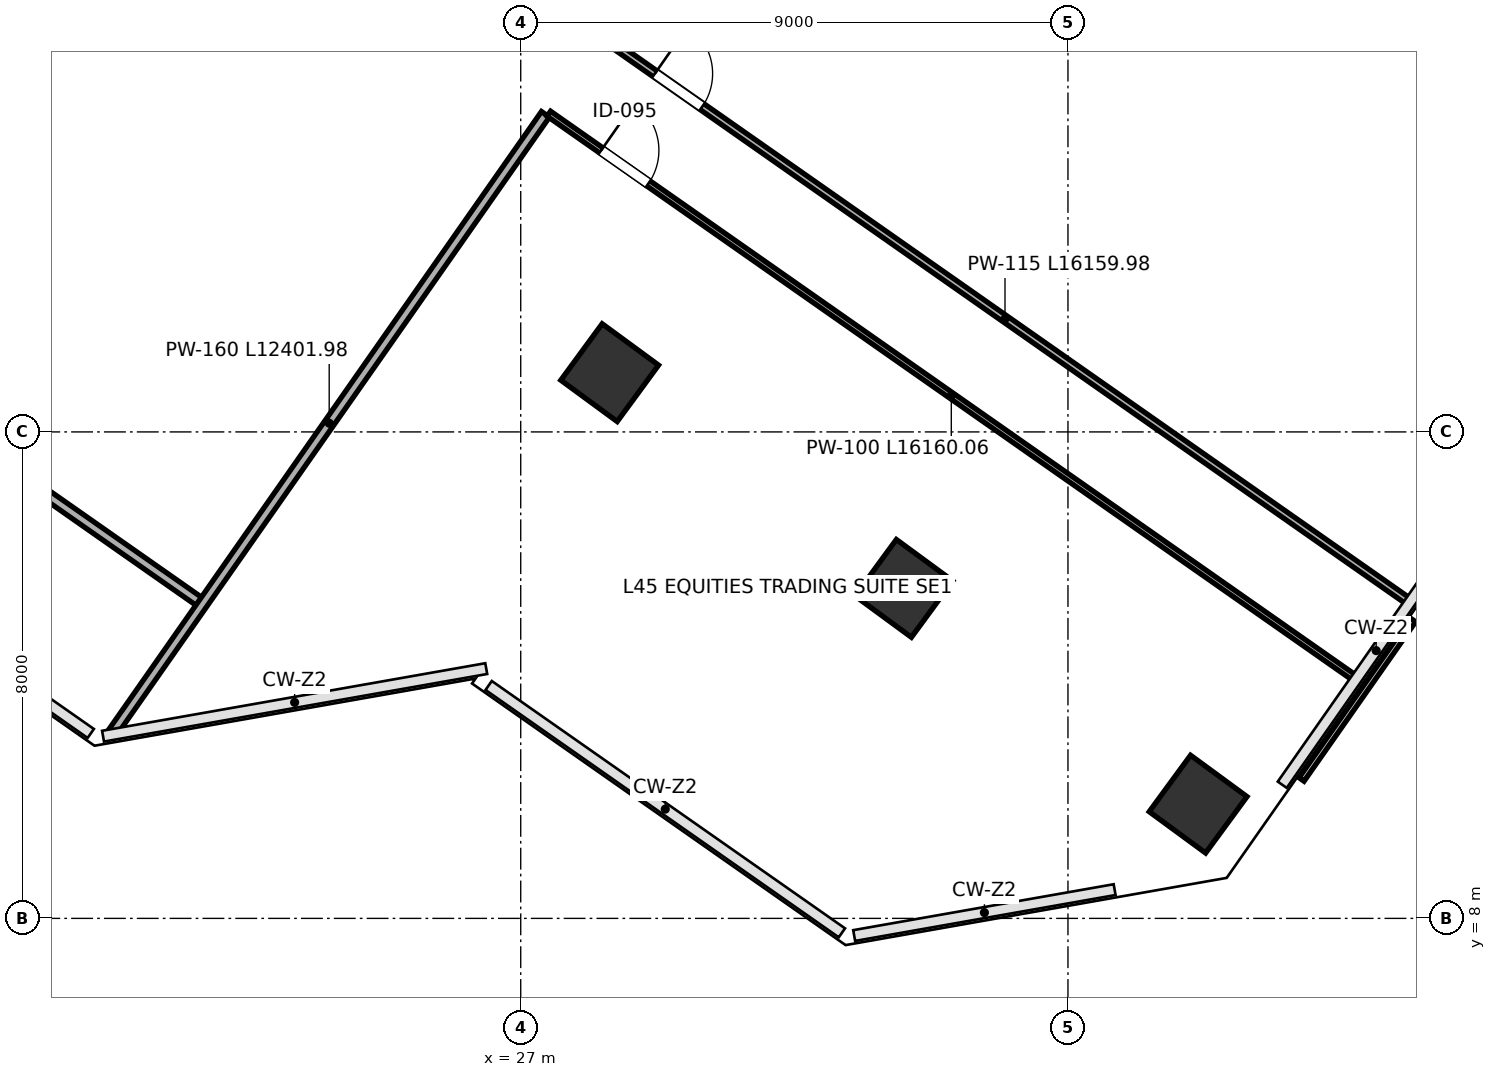
"""IFC4 building model, lengths in metres.
Left out: names, types, materials, properties, quantities, classifications, styles, units other than length and angle.
Written with IfcOpenShell. Run it as: python <this file> out.ifc"""

import sys

from ifc_helpers import new_model, si_unit, direction, frame, frame_2d, origin, origin_2d, place, context, subcontext, project, spatial, rectangle, extrude, clip, halfspace, source, transform, mapped, element, fill, save


model = new_model("IFC4")
c1 = context("Model", 3, precision=1e-05, world=origin(), true_north=direction((0.0, 1.0)))
c2 = subcontext(c1, "Body", "Model", "MODEL_VIEW")
j1 = project(units=[si_unit("LENGTHUNIT", "METRE"), si_unit("PLANEANGLEUNIT", "RADIAN")], contexts=[c1])
p1 = place(None, origin())
s1 = spatial("IfcSite", under=j1, at=p1, CompositionType="ELEMENT")
p2 = place(p1, origin())
s2 = spatial("IfcBuilding", under=s1, at=p2, CompositionType="ELEMENT")
p3 = place(p2, frame((0.0, 0.0, 200.2)))
s3 = spatial("IfcBuildingStorey", under=s2, at=p3, CompositionType="ELEMENT", Elevation=200.2)
p4 = place(p3, frame((28.463, 16.975, 0.0), z_axis=(-0.078128081862, -0.035212656614, 0.99632126929), x_axis=(0.205735778945, 0.977294738554, 0.050673299241)))
e1 = element("IfcColumn", 1, at=p4, inside=s3, PredefinedType="COLUMN", context=c2, shape_type="Clipping", body=[
    clip(clip(extrude(rectangle(XDim=1.15, YDim=1.15, at=origin_2d()), origin(), (0.0, 0.0, 1.0), 4.216), halfspace(frame((0.0, 0.0, 0.07), z_axis=(0.0, 0.0, -1.0), x_axis=(1.0, 0.0, 0.0)), False)), halfspace(frame((0.0, 0.0, 4.146), z_axis=(0.0, 0.0, 1.0), x_axis=(1.0, 0.0, 0.0)), False)),
])
p5 = place(p3, frame((33.302, 13.427, 0.0), z_axis=(-0.09644878078, -0.05983289634, 0.993537949553), x_axis=(0.074102291921, 0.994989736896, 0.067113886818)))
e2 = element("IfcColumn", 2, at=p5, inside=s3, PredefinedType="COLUMN", context=c2, shape_type="Clipping", body=[
    clip(clip(extrude(rectangle(XDim=1.15, YDim=1.15, at=origin_2d()), origin(), (0.0, 0.0, 1.0), 4.227), halfspace(frame((0.0, 0.0, 0.093), z_axis=(0.0, 0.0, -1.0), x_axis=(1.0, 0.0, 0.0)), False)), halfspace(frame((0.0, 0.0, 4.135), z_axis=(0.0, 0.0, 1.0), x_axis=(1.0, 0.0, 0.0)), False)),
])
p6 = place(p3, frame((38.14, 9.879, 0.0), z_axis=(-0.114672590515, -0.084292696992, 0.989820659624), x_axis=(-0.006047009792, 0.996434297912, 0.084155354062)))
e3 = element("IfcColumn", 3, at=p6, inside=s3, PredefinedType="COLUMN", context=c2, shape_type="Clipping", body=[
    clip(clip(extrude(rectangle(XDim=1.15, YDim=1.15, at=origin_2d()), origin(), (0.0, 0.0, 1.0), 4.243), halfspace(frame((0.0, 0.0, 0.116), z_axis=(0.0, 0.0, -1.0), x_axis=(1.0, 0.0, 0.0)), False)), halfspace(frame((0.0, 0.0, 4.127), z_axis=(0.0, 0.0, 1.0), x_axis=(1.0, 0.0, 0.0)), False)),
])
p7 = place(p3, frame((7.614, 23.082, 0.0), z_axis=(0.0, 0.0, 1.0), x_axis=(0.819144092075, -0.573587793123, 0.0)))
e4 = element("IfcWall", 4, at=p7, inside=s3, PredefinedType="PARTITIONING", context=c2, shape_type="SweptSolid", body=[
    extrude(rectangle(XDim=17.24, YDim=0.16, at=frame_2d((8.62, 0.0))), origin(), (0.0, 0.0, 1.0), 3.96),
])
p8 = place(p3, frame((20.293, 11.064, 0.0), z_axis=(0.0, 0.0, 1.0), x_axis=(0.573585209026, 0.819145901526, 0.0)))
e5 = element("IfcWall", 5, at=p8, inside=s3, PredefinedType="PARTITIONING", context=c2, shape_type="SweptSolid", body=[
    extrude(rectangle(XDim=12.402, YDim=0.16, at=frame_2d((6.201, 0.0))), origin(), (0.0, 0.0, 1.0), 3.96),
])
p9 = place(p3, frame((28.346, 22.494, 0.0), z_axis=(0.0, 0.0, 1.0), x_axis=(0.819146739804, -0.573584011866, 0.0)))
e6 = element("IfcWall", 6, at=p9, inside=s3, PredefinedType="PARTITIONING", context=c2, shape_type="SweptSolid", body=[
    extrude(rectangle(XDim=16.16, YDim=0.115, at=frame_2d((8.08, 0.0))), origin(), (0.0, 0.0, 1.0), 3.96),
])
p10 = place(p9, frame((1.05, 0.0, 0.0)))
e7 = element("IfcOpeningElement", 7, at=p10, cuts=e6, PredefinedType="OPENING", context=c2, shape_type="SweptSolid", body=[
    extrude(rectangle(XDim=0.95, YDim=2.15, at=frame_2d((0.475, 1.075))), frame((0.0, 0.067, 0.0), z_axis=(0.0, -1.0, 0.0), x_axis=(1.0, 0.0, 0.0)), (0.0, 0.0, 1.0), 0.135),
])
p11 = place(p3, frame((27.462, 21.233, 0.0), z_axis=(0.0, 0.0, 1.0), x_axis=(0.819151710168, -0.573576913525, 0.0)))
e8 = element("IfcWall", 8, at=p11, inside=s3, PredefinedType="PARTITIONING", context=c2, shape_type="SweptSolid", body=[
    extrude(rectangle(XDim=16.16, YDim=0.1, at=frame_2d((8.08, 0.0))), origin(), (0.0, 0.0, 1.0), 3.96),
])
p12 = place(p11, frame((1.05, 0.0, 0.0)))
e9 = element("IfcOpeningElement", 9, at=p12, cuts=e8, PredefinedType="OPENING", context=c2, shape_type="SweptSolid", body=[
    extrude(rectangle(XDim=0.95, YDim=2.15, at=frame_2d((0.475, 1.075))), frame((0.0, 0.06, 0.0), z_axis=(0.0, -1.0, 0.0), x_axis=(1.0, 0.0, 0.0)), (0.0, 0.0, 1.0), 0.12),
])
m1 = source(origin(), c2, "Body", "SweptSolid", [
    extrude(rectangle(XDim=0.95, YDim=2.15, at=frame_2d((0.475, 1.075))), frame((0.0, 0.025, 0.0), z_axis=(0.0, -1.0, 0.0), x_axis=(1.0, 0.0, 0.0)), (0.0, 0.0, 1.0), 0.05),
])
p13 = place(p10, origin())
e10 = element("IfcDoor", 10, at=p13, inside=s3, OperationType="SINGLE_SWING_LEFT", PredefinedType="DOOR", context=c2, shape_type="MappedRepresentation", body=[
    mapped(m1, transform((0.0, 0.0, 0.0), scale=1.0)),
])
fill(e7, e10)
p14 = place(p12, origin())
e11 = element("IfcDoor", 11, at=p14, inside=s3, OperationType="SINGLE_SWING_LEFT", PredefinedType="DOOR", context=c2, shape_type="MappedRepresentation", body=[
    mapped(m1, transform((0.0, 0.0, 0.0), scale=1.0)),
])
fill(e9, e11)
save(model, sys.argv[1])
